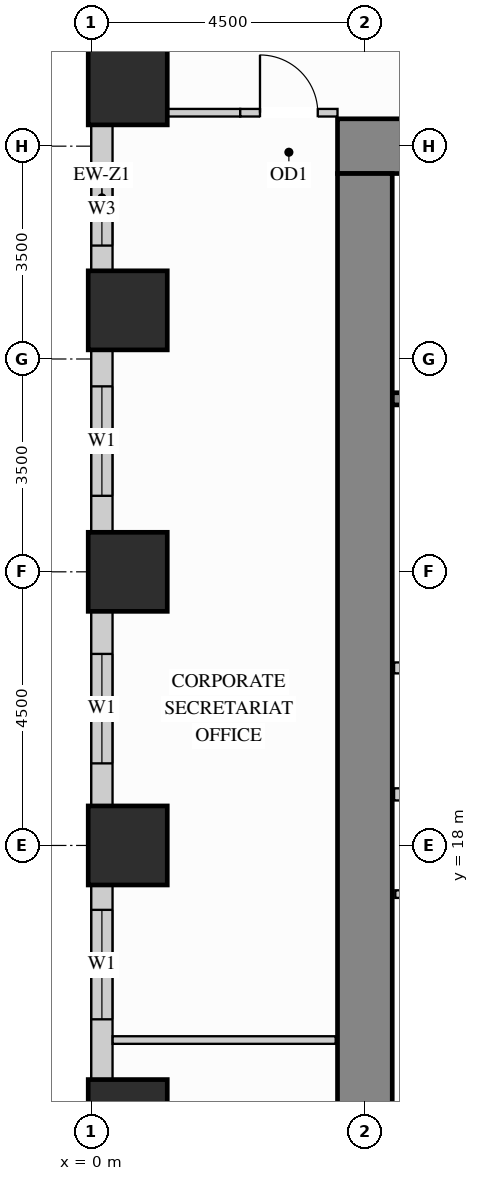
"""IFC4 building model, lengths in metres.
Left out: names, types, materials, properties, quantities, classifications, styles, units other than length and angle.
Written with IfcOpenShell. Run it as: python <this file> out.ifc"""

import sys

from ifc_helpers import new_model, si_unit, direction, frame, frame_2d, origin, origin_2d, place, context, subcontext, project, spatial, rectangle, extrude, source, transform, mapped, element, fill, save


model = new_model("IFC4")
c1 = context("Model", 3, precision=1e-05, world=origin(), true_north=direction((0.0, 1.0)))
c2 = subcontext(c1, "Body", "Model", "MODEL_VIEW")
j1 = project(units=[si_unit("LENGTHUNIT", "METRE"), si_unit("PLANEANGLEUNIT", "RADIAN")], contexts=[c1])
p1 = place(None, origin())
s1 = spatial("IfcSite", under=j1, at=p1, CompositionType="ELEMENT")
p2 = place(p1, origin())
s2 = spatial("IfcBuilding", under=s1, at=p2, CompositionType="ELEMENT")
p3 = place(p2, frame((0.0, 0.0, 51.3)))
s3 = spatial("IfcBuildingStorey", under=s2, at=p3, CompositionType="ELEMENT", Elevation=51.3)
m1 = source(origin(), c2, "Body", "SweptSolid", [
    extrude(rectangle(XDim=1.3, YDim=1.3, at=origin_2d()), origin(), (0.0, 0.0, 1.0), 3.38),
])
for number, where, z_axis, x_axis in (
    (1, (0.6, 13.5, 0.0), (0.0, 0.0, 1.0), (1.0, 0.0, 0.0)),
    (2, (0.6, 18.0, 0.0), (0.0, 0.0, 1.0), (1.0, 0.0, 0.0)),
    (3, (0.6, 22.5, 0.0), (0.0, 0.0, 1.0), (1.0, 0.0, 0.0)),
    (4, (0.6, 26.8, 0.0), (0.0, 0.0, 1.0), (1.0, 0.0, 0.0)),
    (5, (0.6, 30.5, 0.0), (0.0, 0.0, 1.0), (1.0, 0.0, 0.0)),
):
    element("IfcColumn", number, at=place(p3, frame(where, z_axis=z_axis, x_axis=x_axis)), inside=s3, PredefinedType="COLUMN", context=c2, shape_type="MappedRepresentation", body=[
        mapped(m1, transform((0.0, 0.0, 0.0), x_axis=(1.0, 0.0, 0.0), y_axis=(0.0, 1.0, 0.0), z_axis=(0.0, 0.0, 1.0))),
    ])
m2 = source(origin(), c2, "Body", "SweptSolid", [
    extrude(rectangle(XDim=10.9, YDim=0.9, at=frame_2d((5.45, 0.0))), origin(), (0.0, 0.0, 1.0), 3.38),
])
p4 = place(p3, frame((4.05, 29.5, 0.0), z_axis=(0.0, 0.0, 1.0), x_axis=(1.0, 0.0, 0.0)))
e6 = element("IfcWall", 6, at=p4, inside=s3, PredefinedType="SHEAR", context=c2, shape_type="MappedRepresentation", body=[
    mapped(m2, transform((0.0, 0.0, 0.0), x_axis=(1.0, 0.0, 0.0), y_axis=(0.0, 1.0, 0.0), z_axis=(0.0, 0.0, 1.0))),
])
m3 = source(origin(), c2, "Body", "SweptSolid", [
    extrude(rectangle(XDim=20.1, YDim=0.9, at=frame_2d((10.05, 0.0))), origin(), (0.0, 0.0, 1.0), 3.38),
])
p5 = place(p3, frame((4.5, 8.95, 0.0), z_axis=(0.0, 0.0, 1.0), x_axis=(0.0, 1.0, 0.0)))
e7 = element("IfcWall", 7, at=p5, inside=s3, PredefinedType="SHEAR", context=c2, shape_type="MappedRepresentation", body=[
    mapped(m3, transform((0.0, 0.0, 0.0), x_axis=(1.0, 0.0, 0.0), y_axis=(0.0, 1.0, 0.0), z_axis=(0.0, 0.0, 1.0))),
])
p6 = place(p3, frame((0.175, 29.852, 0.0), z_axis=(0.0, 0.0, 1.0), x_axis=(0.0, -1.0, 0.0)))
e8 = element("IfcWall", 8, at=p6, inside=s3, PredefinedType="SOLIDWALL", context=c2, shape_type="SweptSolid", body=[
    extrude(rectangle(XDim=2.404, YDim=0.35, at=frame_2d((1.202, 0.0))), origin(), (0.0, 0.0, 1.0), 2.51),
])
p7 = place(p6, frame((0.787, 0.0, 0.78)))
e9 = element("IfcOpeningElement", 9, at=p7, cuts=e8, PredefinedType="OPENING", context=c2, shape_type="SweptSolid", body=[
    extrude(rectangle(XDim=1.2, YDim=1.55, at=frame_2d((0.6, 0.775))), frame((0.0, 0.185, 0.0), z_axis=(0.0, -1.0, 0.0), x_axis=(1.0, 0.0, 0.0)), (0.0, 0.0, 1.0), 0.37),
])
p8 = place(p3, frame((0.175, 26.152, 0.0), z_axis=(0.0, 0.0, 1.0), x_axis=(0.0, -1.0, 0.0)))
e10 = element("IfcWall", 10, at=p8, inside=s3, PredefinedType="SOLIDWALL", context=c2, shape_type="SweptSolid", body=[
    extrude(rectangle(XDim=3.004, YDim=0.35, at=frame_2d((1.502, 0.0))), origin(), (0.0, 0.0, 1.0), 2.51),
])
p9 = place(p8, frame((0.602, 0.0, 0.78)))
e11 = element("IfcOpeningElement", 11, at=p9, cuts=e10, PredefinedType="OPENING", context=c2, shape_type="SweptSolid", body=[
    extrude(rectangle(XDim=1.8, YDim=1.55, at=frame_2d((0.9, 0.775))), frame((0.0, 0.185, 0.0), z_axis=(0.0, -1.0, 0.0), x_axis=(1.0, 0.0, 0.0)), (0.0, 0.0, 1.0), 0.37),
])
p10 = place(p3, frame((0.175, 21.852, 0.0), z_axis=(0.0, 0.0, 1.0), x_axis=(0.0, -1.0, 0.0)))
e12 = element("IfcWall", 12, at=p10, inside=s3, PredefinedType="SOLIDWALL", context=c2, shape_type="SweptSolid", body=[
    extrude(rectangle(XDim=3.204, YDim=0.35, at=frame_2d((1.602, 0.0))), origin(), (0.0, 0.0, 1.0), 2.51),
])
p11 = place(p10, frame((0.702, 0.0, 0.78)))
e13 = element("IfcOpeningElement", 13, at=p11, cuts=e12, PredefinedType="OPENING", context=c2, shape_type="SweptSolid", body=[
    extrude(rectangle(XDim=1.8, YDim=1.55, at=frame_2d((0.9, 0.775))), frame((0.0, 0.185, 0.0), z_axis=(0.0, -1.0, 0.0), x_axis=(1.0, 0.0, 0.0)), (0.0, 0.0, 1.0), 0.37),
])
p12 = place(p3, frame((0.175, 17.352, 0.0), z_axis=(0.0, 0.0, 1.0), x_axis=(0.0, -1.0, 0.0)))
e14 = element("IfcWall", 14, at=p12, inside=s3, PredefinedType="SOLIDWALL", context=c2, shape_type="SweptSolid", body=[
    extrude(rectangle(XDim=3.204, YDim=0.35, at=frame_2d((1.602, 0.0))), origin(), (0.0, 0.0, 1.0), 2.51),
])
p13 = place(p12, frame((0.411, 0.0, 0.78)))
e15 = element("IfcOpeningElement", 15, at=p13, cuts=e14, PredefinedType="OPENING", context=c2, shape_type="SweptSolid", body=[
    extrude(rectangle(XDim=1.8, YDim=1.55, at=frame_2d((0.9, 0.775))), frame((0.0, 0.185, 0.0), z_axis=(0.0, -1.0, 0.0), x_axis=(1.0, 0.0, 0.0)), (0.0, 0.0, 1.0), 0.37),
])
m4 = source(origin(), c2, "Body", "SweptSolid", [
    extrude(rectangle(XDim=2.17, YDim=0.18, at=frame_2d((1.085, 0.0))), origin(), (0.0, 0.0, 1.0), 3.365),
])
p14 = place(p3, frame((4.98, 20.92, 0.0), z_axis=(0.0, 0.0, 1.0), x_axis=(1.0, 0.0, 0.0)))
e16 = element("IfcWall", 16, at=p14, inside=s3, PredefinedType="PARTITIONING", context=c2, shape_type="MappedRepresentation", body=[
    mapped(m4, transform((0.0, 0.0, 0.0), x_axis=(1.0, 0.0, 0.0), y_axis=(0.0, 1.0, 0.0), z_axis=(0.0, 0.0, 1.0))),
])
p15 = place(p3, frame((5.0, 17.2, 0.0), z_axis=(0.0, 0.0, 1.0), x_axis=(1.0, 0.0, 0.0)))
e17 = element("IfcWall", 17, at=p15, inside=s3, PredefinedType="PARTITIONING", context=c2, shape_type="SweptSolid", body=[
    extrude(rectangle(XDim=2.4, YDim=0.125, at=frame_2d((1.2, 0.0))), origin(), (0.0, 0.0, 1.0), 3.365),
])
p16 = place(p15, frame((0.7, 0.0, 0.0)))
e18 = element("IfcOpeningElement", 18, at=p16, cuts=e17, PredefinedType="OPENING", context=c2, shape_type="SweptSolid", body=[
    extrude(rectangle(XDim=0.85, YDim=2.1, at=frame_2d((0.425, 1.05))), frame((0.0, 0.073, 0.0), z_axis=(0.0, -1.0, 0.0), x_axis=(1.0, 0.0, 0.0)), (0.0, 0.0, 1.0), 0.145),
])
m5 = source(origin(), c2, "Body", "SweptSolid", [
    extrude(rectangle(XDim=1.19, YDim=0.125, at=frame_2d((0.595, 0.0))), origin(), (0.0, 0.0, 1.0), 3.365),
])
p17 = place(p3, frame((1.26, 30.05, 0.0), z_axis=(0.0, 0.0, 1.0), x_axis=(1.0, 0.0, 0.0)))
e19 = element("IfcWall", 19, at=p17, inside=s3, PredefinedType="PARTITIONING", context=c2, shape_type="MappedRepresentation", body=[
    mapped(m5, transform((0.0, 0.0, 0.0), x_axis=(1.0, 0.0, 0.0), y_axis=(0.0, 1.0, 0.0), z_axis=(0.0, 0.0, 1.0))),
])
p18 = place(p3, frame((2.45, 30.05, 0.0), z_axis=(0.0, 0.0, 1.0), x_axis=(1.0, 0.0, 0.0)))
e20 = element("IfcWall", 20, at=p18, inside=s3, PredefinedType="PARTITIONING", context=c2, shape_type="SweptSolid", body=[
    extrude(rectangle(XDim=1.6, YDim=0.125, at=frame_2d((0.8, 0.0))), origin(), (0.0, 0.0, 1.0), 3.365),
])
p19 = place(p18, frame((0.325, 0.0, 0.0)))
e21 = element("IfcOpeningElement", 21, at=p19, cuts=e20, PredefinedType="OPENING", context=c2, shape_type="SweptSolid", body=[
    extrude(rectangle(XDim=0.95, YDim=2.15, at=frame_2d((0.475, 1.075))), frame((0.0, 0.073, 0.0), z_axis=(0.0, -1.0, 0.0), x_axis=(1.0, 0.0, 0.0)), (0.0, 0.0, 1.0), 0.145),
])
m6 = source(origin(), c2, "Body", "SweptSolid", [
    extrude(rectangle(XDim=3.668, YDim=0.125, at=frame_2d((1.834, 0.0))), origin(), (0.0, 0.0, 1.0), 3.365),
])
p20 = place(p3, frame((0.352, 14.8, 0.0), z_axis=(0.0, 0.0, 1.0), x_axis=(1.0, 0.0, 0.0)))
e22 = element("IfcWall", 22, at=p20, inside=s3, PredefinedType="PARTITIONING", context=c2, shape_type="MappedRepresentation", body=[
    mapped(m6, transform((0.0, 0.0, 0.0), x_axis=(1.0, 0.0, 0.0), y_axis=(0.0, 1.0, 0.0), z_axis=(0.0, 0.0, 1.0))),
])
m7 = source(origin(), c2, "Body", "SweptSolid", [
    extrude(rectangle(XDim=2.09, YDim=0.2, at=frame_2d((1.045, 0.0))), origin(), (0.0, 0.0, 1.0), 3.365),
])
p21 = place(p3, frame((4.98, 18.84, 0.0), z_axis=(0.0, 0.0, 1.0), x_axis=(1.0, 0.0, 0.0)))
e23 = element("IfcWall", 23, at=p21, inside=s3, PredefinedType="PARTITIONING", context=c2, shape_type="MappedRepresentation", body=[
    mapped(m7, transform((0.0, 0.0, 0.0), x_axis=(1.0, 0.0, 0.0), y_axis=(0.0, 1.0, 0.0), z_axis=(0.0, 0.0, 1.0))),
])
p22 = place(p3, frame((4.952, 25.345, 0.0), z_axis=(0.0, 0.0, 1.0), x_axis=(1.0, 0.0, 0.0)))
e24 = element("IfcWall", 24, at=p22, inside=s3, PredefinedType="SHEAR", context=c2, shape_type="SweptSolid", body=[
    extrude(rectangle(XDim=7.453, YDim=0.2, at=frame_2d((3.727, 0.0))), origin(), (0.0, 0.0, 1.0), 3.38),
])
p23 = place(p22, frame((0.4, 0.0, 0.0)))
e25 = element("IfcOpeningElement", 25, at=p23, cuts=e24, PredefinedType="OPENING", context=c2, shape_type="SweptSolid", body=[
    extrude(rectangle(XDim=1.1, YDim=2.15, at=frame_2d((0.55, 1.075))), frame((0.0, 0.11, 0.0), z_axis=(0.0, -1.0, 0.0), x_axis=(1.0, 0.0, 0.0)), (0.0, 0.0, 1.0), 0.22),
])
m8 = source(origin(), c2, "Body", "SweptSolid", [
    extrude(rectangle(XDim=0.95, YDim=2.15, at=frame_2d((0.475, 1.075))), frame((0.0, 0.025, 0.0), z_axis=(0.0, -1.0, 0.0), x_axis=(1.0, 0.0, 0.0)), (0.0, 0.0, 1.0), 0.05),
])
p24 = place(p19, origin())
e26 = element("IfcDoor", 26, at=p24, inside=s3, OperationType="SINGLE_SWING_LEFT", PredefinedType="DOOR", context=c2, shape_type="MappedRepresentation", body=[
    mapped(m8, transform((0.0, 0.0, 0.0), x_axis=(1.0, 0.0, 0.0), y_axis=(0.0, 1.0, 0.0), z_axis=(0.0, 0.0, 1.0))),
])
fill(e21, e26)
m9 = source(origin(), c2, "Body", "SweptSolid", [
    extrude(rectangle(XDim=1.8, YDim=1.55, at=frame_2d((0.9, 0.775))), frame((0.0, 0.03, 0.0), z_axis=(0.0, -1.0, 0.0), x_axis=(1.0, 0.0, 0.0)), (0.0, 0.0, 1.0), 0.06),
])
p25 = place(p9, origin())
e27 = element("IfcWindow", 27, at=p25, inside=s3, PartitioningType="SINGLE_PANEL", PredefinedType="WINDOW", context=c2, shape_type="MappedRepresentation", body=[
    mapped(m9, transform((0.0, 0.0, 0.0), x_axis=(1.0, 0.0, 0.0), y_axis=(0.0, 1.0, 0.0), z_axis=(0.0, 0.0, 1.0))),
])
fill(e11, e27)
p26 = place(p11, origin())
e28 = element("IfcWindow", 28, at=p26, inside=s3, PartitioningType="SINGLE_PANEL", PredefinedType="WINDOW", context=c2, shape_type="MappedRepresentation", body=[
    mapped(m9, transform((0.0, 0.0, 0.0), x_axis=(1.0, 0.0, 0.0), y_axis=(0.0, 1.0, 0.0), z_axis=(0.0, 0.0, 1.0))),
])
fill(e13, e28)
p27 = place(p13, origin())
e29 = element("IfcWindow", 29, at=p27, inside=s3, PartitioningType="SINGLE_PANEL", PredefinedType="WINDOW", context=c2, shape_type="MappedRepresentation", body=[
    mapped(m9, transform((0.0, 0.0, 0.0), x_axis=(1.0, 0.0, 0.0), y_axis=(0.0, 1.0, 0.0), z_axis=(0.0, 0.0, 1.0))),
])
fill(e15, e29)
m10 = source(origin(), c2, "Body", "SweptSolid", [
    extrude(rectangle(XDim=1.2, YDim=1.55, at=frame_2d((0.6, 0.775))), frame((0.0, 0.03, 0.0), z_axis=(0.0, -1.0, 0.0), x_axis=(1.0, 0.0, 0.0)), (0.0, 0.0, 1.0), 0.06),
])
p28 = place(p7, origin())
e30 = element("IfcWindow", 30, at=p28, inside=s3, PartitioningType="SINGLE_PANEL", PredefinedType="WINDOW", context=c2, shape_type="MappedRepresentation", body=[
    mapped(m10, transform((0.0, 0.0, 0.0), x_axis=(1.0, 0.0, 0.0), y_axis=(0.0, 1.0, 0.0), z_axis=(0.0, 0.0, 1.0))),
])
fill(e9, e30)
save(model, sys.argv[1])
